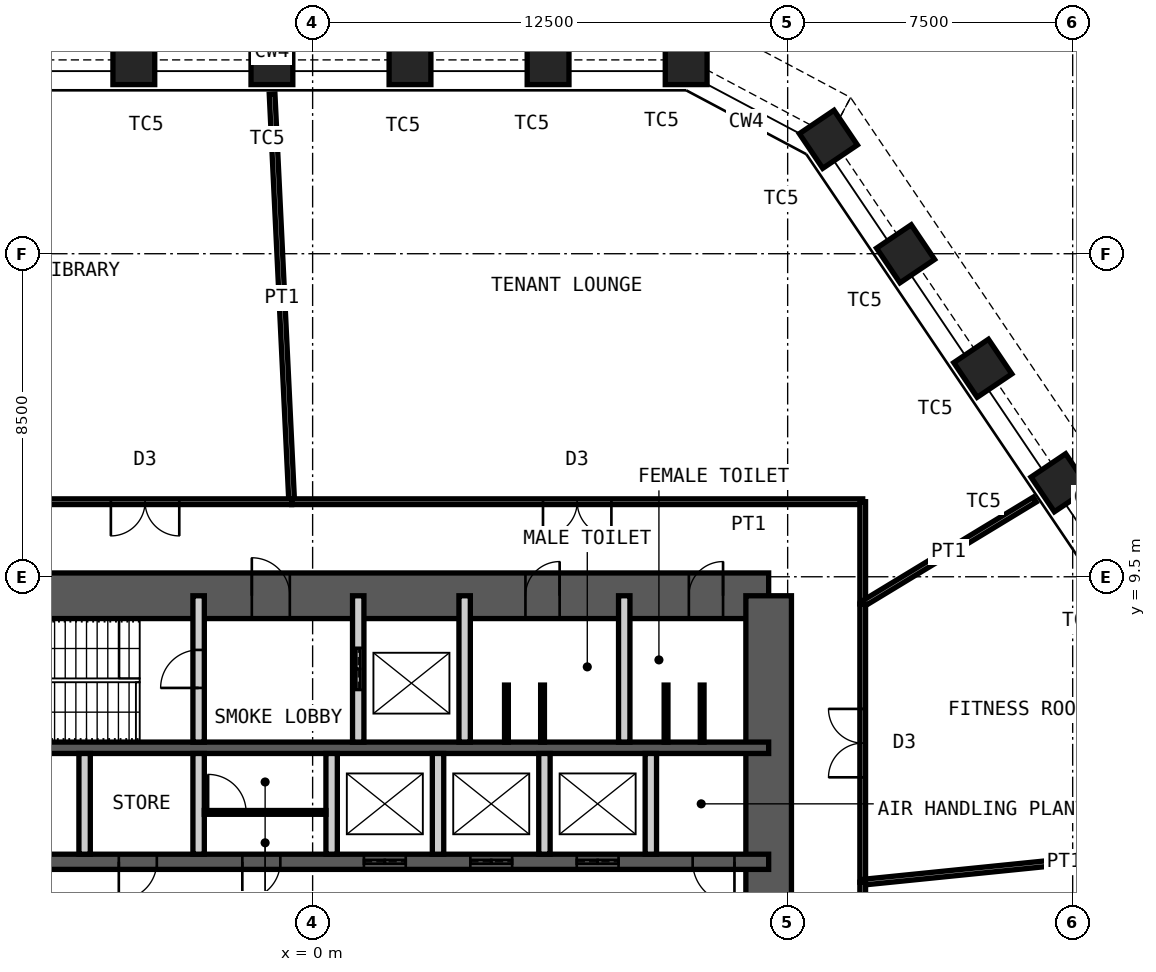
"""IFC4 building model, lengths in metres.
Left out: names, types, materials, properties, quantities, classifications, styles, units other than length and angle.
Written with IfcOpenShell. Run it as: python <this file> out.ifc"""

import sys

from ifc_helpers import new_model, si_unit, direction, frame, frame_2d, origin, origin_2d, place, context, subcontext, project, spatial, rectangle, hollow_rectangle, extrude, element, fill, save


model = new_model("IFC4")
c1 = context("Model", 3, precision=1e-05, world=origin(), true_north=direction((0.0, 1.0)))
c2 = subcontext(c1, "Body", "Model", "MODEL_VIEW")
j1 = project(units=[si_unit("LENGTHUNIT", "METRE"), si_unit("PLANEANGLEUNIT", "RADIAN")], contexts=[c1])
p1 = place(None, origin())
s1 = spatial("IfcSite", under=j1, at=p1, CompositionType="ELEMENT")
p2 = place(p1, origin())
s2 = spatial("IfcBuilding", under=s1, at=p2, CompositionType="ELEMENT")
p3 = place(p2, frame((0.0, 0.0, 218.2)))
s3 = spatial("IfcBuildingStorey", under=s2, at=p3, CompositionType="ELEMENT", Elevation=218.2)
for number, where, z_axis, x_axis in (
    (1, (-4.705, 23.0, 0.0), (0.0, 0.0, 1.0), (-1.0, 0.0, 0.0)),
    (2, (-1.071, 23.0, 0.0), (0.0, 0.0, 1.0), (-1.0, 0.0, 0.0)),
    (3, (2.562, 23.0, 0.0), (0.0, 0.0, 1.0), (-1.0, 0.0, 0.0)),
    (4, (6.196, 23.0, 0.0), (0.0, 0.0, 1.0), (-1.0, 0.0, 0.0)),
    (5, (9.829, 23.0, 0.0), (0.0, 0.0, 1.0), (-1.0, 0.0, 0.0)),
    (6, (13.571, 21.01, 0.0), (0.0, 0.0, 1.0), (-0.559, 0.829, 0.0)),
    (7, (15.603, 17.998, 0.0), (0.0, 0.0, 1.0), (-0.559, 0.829, 0.0)),
    (8, (17.635, 14.986, 0.0), (0.0, 0.0, 1.0), (-0.559, 0.829, 0.0)),
    (9, (19.667, 11.973, 0.0), (0.0, 0.0, 1.0), (-0.559, 0.829, 0.0)),
):
    element("IfcColumn", number, at=place(p3, frame(where, z_axis=z_axis, x_axis=x_axis)), inside=s3, PredefinedType="COLUMN", context=c2, shape_type="SweptSolid", body=[
        extrude(hollow_rectangle(XDim=1.1, YDim=1.1, WallThickness=0.07, at=origin_2d()), origin(), (0.0, 0.0, 1.0), 4.2),
    ])
p4 = place(p3, frame((-12.0, 9.0, 0.0), z_axis=(0.0, 0.0, 1.0), x_axis=(1.0, 0.0, 0.0)))
e10 = element("IfcWall", 10, at=p4, inside=s3, PredefinedType="SHEAR", context=c2, shape_type="SweptSolid", body=[
    extrude(rectangle(XDim=24.0, YDim=1.2, at=frame_2d((12.0, 0.0))), origin(), (0.0, 0.0, 1.0), 4.2),
])
p5 = place(p4, frame((10.4, 0.0, 0.0)))
e11 = element("IfcOpeningElement", 11, at=p5, cuts=e10, PredefinedType="OPENING", context=c2, shape_type="SweptSolid", body=[
    extrude(rectangle(XDim=1.0, YDim=2.1, at=frame_2d((0.5, 1.05))), frame((0.0, 0.61, 0.0), z_axis=(0.0, -1.0, 0.0), x_axis=(1.0, 0.0, 0.0)), (0.0, 0.0, 1.0), 1.22),
])
p6 = place(p4, frame((17.6, 0.0, 0.0)))
e12 = element("IfcOpeningElement", 12, at=p6, cuts=e10, PredefinedType="OPENING", context=c2, shape_type="SweptSolid", body=[
    extrude(rectangle(XDim=0.9, YDim=2.1, at=frame_2d((0.45, 1.05))), frame((0.0, 0.61, 0.0), z_axis=(0.0, -1.0, 0.0), x_axis=(1.0, 0.0, 0.0)), (0.0, 0.0, 1.0), 1.22),
])
p7 = place(p4, frame((21.9, 0.0, 0.0)))
e13 = element("IfcOpeningElement", 13, at=p7, cuts=e10, PredefinedType="OPENING", context=c2, shape_type="SweptSolid", body=[
    extrude(rectangle(XDim=0.9, YDim=2.1, at=frame_2d((0.45, 1.05))), frame((0.0, 0.61, 0.0), z_axis=(0.0, -1.0, 0.0), x_axis=(1.0, 0.0, 0.0)), (0.0, 0.0, 1.0), 1.22),
])
p8 = place(p3, frame((12.0, -9.0, 0.0), z_axis=(0.0, 0.0, 1.0), x_axis=(0.0, 1.0, 0.0)))
e14 = element("IfcWall", 14, at=p8, inside=s3, PredefinedType="SHEAR", context=c2, shape_type="SweptSolid", body=[
    extrude(rectangle(XDim=18.0, YDim=1.2, at=frame_2d((9.0, 0.0))), origin(), (0.0, 0.0, 1.0), 4.2),
])
p9 = place(p8, frame((8.1, 0.0, 0.0)))
e15 = element("IfcOpeningElement", 15, at=p9, cuts=e14, PredefinedType="OPENING", context=c2, shape_type="SweptSolid", body=[
    extrude(rectangle(XDim=1.8, YDim=2.1, at=frame_2d((0.9, 1.05))), frame((0.0, 0.61, 0.0), z_axis=(0.0, -1.0, 0.0), x_axis=(1.0, 0.0, 0.0)), (0.0, 0.0, 1.0), 1.22),
])
p10 = place(p3, frame((-12.0, 5.0, 0.0), z_axis=(0.0, 0.0, 1.0), x_axis=(1.0, 0.0, 0.0)))
e16 = element("IfcWall", 16, at=p10, inside=s3, PredefinedType="SHEAR", context=c2, shape_type="SweptSolid", body=[
    extrude(rectangle(XDim=24.0, YDim=0.3, at=frame_2d((12.0, 0.0))), origin(), (0.0, 0.0, 1.0), 4.2),
])
p11 = place(p3, frame((-12.0, 2.0, 0.0), z_axis=(0.0, 0.0, 1.0), x_axis=(1.0, 0.0, 0.0)))
e17 = element("IfcWall", 17, at=p11, inside=s3, PredefinedType="SHEAR", context=c2, shape_type="SweptSolid", body=[
    extrude(rectangle(XDim=24.0, YDim=0.4, at=frame_2d((12.0, 0.0))), origin(), (0.0, 0.0, 1.0), 4.2),
])
p12 = place(p11, frame((2.4, 0.0, 0.0)))
e18 = element("IfcOpeningElement", 18, at=p12, cuts=e17, PredefinedType="OPENING", context=c2, shape_type="SweptSolid", body=[
    extrude(rectangle(XDim=1.1, YDim=2.1, at=frame_2d((0.55, 1.05))), frame((0.0, 0.21, 0.0), z_axis=(0.0, -1.0, 0.0), x_axis=(1.0, 0.0, 0.0)), (0.0, 0.0, 1.0), 0.42),
])
p13 = place(p11, frame((22.0, 0.0, 0.0)))
e19 = element("IfcOpeningElement", 19, at=p13, cuts=e17, PredefinedType="OPENING", context=c2, shape_type="SweptSolid", body=[
    extrude(rectangle(XDim=1.1, YDim=2.1, at=frame_2d((0.55, 1.05))), frame((0.0, 0.21, 0.0), z_axis=(0.0, -1.0, 0.0), x_axis=(1.0, 0.0, 0.0)), (0.0, 0.0, 1.0), 0.42),
])
p14 = place(p11, frame((10.15, 0.0, 0.0)))
e20 = element("IfcOpeningElement", 20, at=p14, cuts=e17, PredefinedType="OPENING", context=c2, shape_type="SweptSolid", body=[
    extrude(rectangle(XDim=1.0, YDim=2.1, at=frame_2d((0.5, 1.05))), frame((0.0, 0.21, 0.0), z_axis=(0.0, -1.0, 0.0), x_axis=(1.0, 0.0, 0.0)), (0.0, 0.0, 1.0), 0.42),
])
p15 = place(p11, frame((6.9, 0.0, 0.0)))
e21 = element("IfcOpeningElement", 21, at=p15, cuts=e17, PredefinedType="OPENING", context=c2, shape_type="SweptSolid", body=[
    extrude(rectangle(XDim=1.0, YDim=2.1, at=frame_2d((0.5, 1.05))), frame((0.0, 0.21, 0.0), z_axis=(0.0, -1.0, 0.0), x_axis=(1.0, 0.0, 0.0)), (0.0, 0.0, 1.0), 0.42),
])
p16 = place(p11, frame((13.35, 0.0, 0.0)))
e22 = element("IfcOpeningElement", 22, at=p16, cuts=e17, PredefinedType="OPENING", context=c2, shape_type="SweptSolid", body=[
    extrude(rectangle(XDim=1.1, YDim=2.4, at=frame_2d((0.55, 1.2))), frame((0.0, 0.21, 0.0), z_axis=(0.0, -1.0, 0.0), x_axis=(1.0, 0.0, 0.0)), (0.0, 0.0, 1.0), 0.42),
])
p17 = place(p11, frame((16.15, 0.0, 0.0)))
e23 = element("IfcOpeningElement", 23, at=p17, cuts=e17, PredefinedType="OPENING", context=c2, shape_type="SweptSolid", body=[
    extrude(rectangle(XDim=1.1, YDim=2.4, at=frame_2d((0.55, 1.2))), frame((0.0, 0.21, 0.0), z_axis=(0.0, -1.0, 0.0), x_axis=(1.0, 0.0, 0.0)), (0.0, 0.0, 1.0), 0.42),
])
p18 = place(p11, frame((18.95, 0.0, 0.0)))
e24 = element("IfcOpeningElement", 24, at=p18, cuts=e17, PredefinedType="OPENING", context=c2, shape_type="SweptSolid", body=[
    extrude(rectangle(XDim=1.1, YDim=2.4, at=frame_2d((0.55, 1.2))), frame((0.0, 0.21, 0.0), z_axis=(0.0, -1.0, 0.0), x_axis=(1.0, 0.0, 0.0)), (0.0, 0.0, 1.0), 0.42),
])
p19 = place(p3, frame((-3.0, 5.15, 0.0), z_axis=(0.0, 0.0, 1.0), x_axis=(0.0, 1.0, 0.0)))
e25 = element("IfcWall", 25, at=p19, inside=s3, PredefinedType="PARTITIONING", context=c2, shape_type="SweptSolid", body=[
    extrude(rectangle(XDim=3.85, YDim=0.3, at=frame_2d((1.925, 0.0))), origin(), (0.0, 0.0, 1.0), 3.98),
])
p20 = place(p19, frame((1.425, 0.0, 0.0)))
e26 = element("IfcOpeningElement", 26, at=p20, cuts=e25, PredefinedType="OPENING", context=c2, shape_type="SweptSolid", body=[
    extrude(rectangle(XDim=1.0, YDim=2.1, at=frame_2d((0.5, 1.05))), frame((0.0, 0.16, 0.0), z_axis=(0.0, -1.0, 0.0), x_axis=(1.0, 0.0, 0.0)), (0.0, 0.0, 1.0), 0.32),
])
p21 = place(p3, frame((1.2, 5.15, 0.0), z_axis=(0.0, 0.0, 1.0), x_axis=(0.0, 1.0, 0.0)))
e27 = element("IfcWall", 27, at=p21, inside=s3, PredefinedType="PARTITIONING", context=c2, shape_type="SweptSolid", body=[
    extrude(rectangle(XDim=3.85, YDim=0.3, at=frame_2d((1.925, 0.0))), origin(), (0.0, 0.0, 1.0), 3.98),
])
p22 = place(p21, frame((1.375, 0.0, 0.0)))
e28 = element("IfcOpeningElement", 28, at=p22, cuts=e27, PredefinedType="OPENING", context=c2, shape_type="SweptSolid", body=[
    extrude(rectangle(XDim=1.1, YDim=2.4, at=frame_2d((0.55, 1.2))), frame((0.0, 0.16, 0.0), z_axis=(0.0, -1.0, 0.0), x_axis=(1.0, 0.0, 0.0)), (0.0, 0.0, 1.0), 0.32),
])
for number, where, z_axis, x_axis in (
    (29, (4.0, 5.15, 0.0), (0.0, 0.0, 1.0), (0.0, 1.0, 0.0)),
    (30, (8.2, 5.15, 0.0), (0.0, 0.0, 1.0), (0.0, 1.0, 0.0)),
):
    element("IfcWall", number, at=place(p3, frame(where, z_axis=z_axis, x_axis=x_axis)), inside=s3, PredefinedType="PARTITIONING", context=c2, shape_type="SweptSolid", body=[
        extrude(rectangle(XDim=3.85, YDim=0.3, at=frame_2d((1.925, 0.0))), origin(), (0.0, 0.0, 1.0), 3.98),
    ])
for number, where, z_axis, x_axis in (
    (31, (-6.0, 2.2, 0.0), (0.0, 0.0, 1.0), (0.0, 1.0, 0.0)),
    (32, (-3.0, 2.2, 0.0), (0.0, 0.0, 1.0), (0.0, 1.0, 0.0)),
    (33, (0.5, 2.2, 0.0), (0.0, 0.0, 1.0), (0.0, 1.0, 0.0)),
    (34, (3.3, 2.2, 0.0), (0.0, 0.0, 1.0), (0.0, 1.0, 0.0)),
    (35, (6.1, 2.2, 0.0), (0.0, 0.0, 1.0), (0.0, 1.0, 0.0)),
    (36, (8.9, 2.2, 0.0), (0.0, 0.0, 1.0), (0.0, 1.0, 0.0)),
):
    element("IfcWall", number, at=place(p3, frame(where, z_axis=z_axis, x_axis=x_axis)), inside=s3, PredefinedType="PARTITIONING", context=c2, shape_type="SweptSolid", body=[
        extrude(rectangle(XDim=2.65, YDim=0.3, at=frame_2d((1.325, 0.0))), origin(), (0.0, 0.0, 1.0), 3.98),
    ])
p23 = place(p3, frame((-2.85, 3.3, 0.0), z_axis=(0.0, 0.0, 1.0), x_axis=(1.0, 0.0, 0.0)))
e37 = element("IfcWall", 37, at=p23, inside=s3, PredefinedType="PARTITIONING", context=c2, shape_type="SweptSolid", body=[
    extrude(rectangle(XDim=3.2, YDim=0.1, at=frame_2d((1.6, 0.0))), origin(), (0.0, 0.0, 1.0), 3.98),
])
p24 = place(p23, frame((0.1, 0.0, 0.0)))
e38 = element("IfcOpeningElement", 38, at=p24, cuts=e37, PredefinedType="OPENING", context=c2, shape_type="SweptSolid", body=[
    extrude(rectangle(XDim=1.0, YDim=2.4, at=frame_2d((0.5, 1.2))), frame((0.0, 0.06, 0.0), z_axis=(0.0, -1.0, 0.0), x_axis=(1.0, 0.0, 0.0)), (0.0, 0.0, 1.0), 0.12),
])
for number, where, z_axis, x_axis in (
    (39, (5.1, 5.15, 0.0), (0.0, 0.0, 1.0), (0.0, 1.0, 0.0)),
    (40, (6.05, 5.15, 0.0), (0.0, 0.0, 1.0), (0.0, 1.0, 0.0)),
    (41, (9.3, 5.15, 0.0), (0.0, 0.0, 1.0), (0.0, 1.0, 0.0)),
    (42, (10.25, 5.15, 0.0), (0.0, 0.0, 1.0), (0.0, 1.0, 0.0)),
):
    element("IfcWall", number, at=place(p3, frame(where, z_axis=z_axis, x_axis=x_axis)), inside=s3, PredefinedType="PARTITIONING", context=c2, shape_type="SweptSolid", body=[
        extrude(rectangle(XDim=1.5, YDim=0.1, at=frame_2d((0.75, 0.0))), origin(), (0.0, 0.0, 1.0), 2.1),
    ])
p25 = place(p3, frame((-1.067, 22.2, 0.0), z_axis=(0.0, 0.0, 1.0), x_axis=(0.047998335863, -0.998847415652, 0.0)))
e43 = element("IfcWall", 43, at=p25, inside=s3, PredefinedType="PARTITIONING", context=c2, shape_type="SweptSolid", body=[
    extrude(rectangle(XDim=10.738, YDim=0.15, at=frame_2d((5.369, 0.0))), origin(), (0.0, 0.0, 1.0), 3.43),
])
p26 = place(p3, frame((-0.551, 11.475, 0.0), z_axis=(0.0, 0.0, 1.0), x_axis=(1.0, 0.0, 0.0)))
e44 = element("IfcWall", 44, at=p26, inside=s3, PredefinedType="PARTITIONING", context=c2, shape_type="SweptSolid", body=[
    extrude(rectangle(XDim=15.026, YDim=0.15, at=frame_2d((7.513, 0.0))), origin(), (0.0, 0.0, 1.0), 4.03),
])
p27 = place(p26, frame((6.613, 0.0, 0.0)))
e45 = element("IfcOpeningElement", 45, at=p27, cuts=e44, PredefinedType="OPENING", context=c2, shape_type="SweptSolid", body=[
    extrude(rectangle(XDim=1.8, YDim=2.4, at=frame_2d((0.9, 1.2))), frame((0.0, 0.085, 0.0), z_axis=(0.0, -1.0, 0.0), x_axis=(1.0, 0.0, 0.0)), (0.0, 0.0, 1.0), 0.17),
])
p28 = place(p3, frame((14.475, 11.475, 0.0), z_axis=(0.0, 0.0, 1.0), x_axis=(0.0, -1.0, 0.0)))
e46 = element("IfcWall", 46, at=p28, inside=s3, PredefinedType="PARTITIONING", context=c2, shape_type="SweptSolid", body=[
    extrude(rectangle(XDim=2.692, YDim=0.15, at=frame_2d((1.346, 0.0))), origin(), (0.0, 0.0, 1.0), 4.03),
])
p29 = place(p3, frame((19.001, 11.53, 0.0), z_axis=(0.0, 0.0, 1.0), x_axis=(-0.854906581035, -0.518781975114, 0.0)))
e47 = element("IfcWall", 47, at=p29, inside=s3, PredefinedType="PARTITIONING", context=c2, shape_type="SweptSolid", body=[
    extrude(rectangle(XDim=5.294, YDim=0.15, at=frame_2d((2.647, 0.0))), origin(), (0.0, 0.0, 1.0), 3.43),
])
p30 = place(p3, frame((14.475, 8.783, 0.0), z_axis=(0.0, 0.0, 1.0), x_axis=(0.0, -1.0, 0.0)))
e48 = element("IfcWall", 48, at=p30, inside=s3, PredefinedType="PARTITIONING", context=c2, shape_type="SweptSolid", body=[
    extrude(rectangle(XDim=7.321, YDim=0.15, at=frame_2d((3.66, 0.0))), origin(), (0.0, 0.0, 1.0), 4.03),
])
p31 = place(p30, frame((2.76, 0.0, 0.0)))
e49 = element("IfcOpeningElement", 49, at=p31, cuts=e48, PredefinedType="OPENING", context=c2, shape_type="SweptSolid", body=[
    extrude(rectangle(XDim=1.8, YDim=2.4, at=frame_2d((0.9, 1.2))), frame((0.0, 0.085, 0.0), z_axis=(0.0, -1.0, 0.0), x_axis=(1.0, 0.0, 0.0)), (0.0, 0.0, 1.0), 0.17),
])
p32 = place(p3, frame((25.083, 2.535, 0.0), z_axis=(0.0, 0.0, 1.0), x_axis=(-0.994932122767, -0.10054884925, 0.0)))
e50 = element("IfcWall", 50, at=p32, inside=s3, PredefinedType="PARTITIONING", context=c2, shape_type="SweptSolid", body=[
    extrude(rectangle(XDim=10.662, YDim=0.15, at=frame_2d((5.331, 0.0))), origin(), (0.0, 0.0, 1.0), 2.93),
])
p33 = place(p3, frame((14.475, 1.463, 0.0), z_axis=(0.0, 0.0, 1.0), x_axis=(0.0, -1.0, 0.0)))
e51 = element("IfcWall", 51, at=p33, inside=s3, PredefinedType="PARTITIONING", context=c2, shape_type="SweptSolid", body=[
    extrude(rectangle(XDim=8.918, YDim=0.15, at=frame_2d((4.459, 0.0))), origin(), (0.0, 0.0, 1.0), 4.03),
])
p34 = place(p33, frame((3.559, 0.0, 0.0)))
e52 = element("IfcOpeningElement", 52, at=p34, cuts=e51, PredefinedType="OPENING", context=c2, shape_type="SweptSolid", body=[
    extrude(rectangle(XDim=1.8, YDim=2.4, at=frame_2d((0.9, 1.2))), frame((0.0, 0.085, 0.0), z_axis=(0.0, -1.0, 0.0), x_axis=(1.0, 0.0, 0.0)), (0.0, 0.0, 1.0), 0.17),
])
p35 = place(p3, frame((-8.267, 11.475, 0.0), z_axis=(0.0, 0.0, 1.0), x_axis=(1.0, 0.0, 0.0)))
e53 = element("IfcWall", 53, at=p35, inside=s3, PredefinedType="PARTITIONING", context=c2, shape_type="SweptSolid", body=[
    extrude(rectangle(XDim=7.716, YDim=0.15, at=frame_2d((3.858, 0.0))), origin(), (0.0, 0.0, 1.0), 4.03),
])
p36 = place(p35, frame((2.958, 0.0, 0.0)))
e54 = element("IfcOpeningElement", 54, at=p36, cuts=e53, PredefinedType="OPENING", context=c2, shape_type="SweptSolid", body=[
    extrude(rectangle(XDim=1.8, YDim=2.4, at=frame_2d((0.9, 1.2))), frame((0.0, 0.085, 0.0), z_axis=(0.0, -1.0, 0.0), x_axis=(1.0, 0.0, 0.0)), (0.0, 0.0, 1.0), 0.17),
])
p37 = place(p5, origin())
e55 = element("IfcDoor", 55, at=p37, inside=s3, OperationType="SINGLE_SWING_RIGHT", PredefinedType="DOOR", context=c2, shape_type="SweptSolid", body=[
    extrude(rectangle(XDim=1.0, YDim=2.1, at=frame_2d((0.5, 1.05))), frame((0.0, 0.025, 0.0), z_axis=(0.0, -1.0, 0.0), x_axis=(1.0, 0.0, 0.0)), (0.0, 0.0, 1.0), 0.05),
])
fill(e11, e55)
p38 = place(p6, origin())
e56 = element("IfcDoor", 56, at=p38, inside=s3, OperationType="SINGLE_SWING_LEFT", PredefinedType="DOOR", context=c2, shape_type="SweptSolid", body=[
    extrude(rectangle(XDim=0.9, YDim=2.1, at=frame_2d((0.45, 1.05))), frame((0.0, 0.025, 0.0), z_axis=(0.0, -1.0, 0.0), x_axis=(1.0, 0.0, 0.0)), (0.0, 0.0, 1.0), 0.05),
])
fill(e12, e56)
p39 = place(p7, origin())
e57 = element("IfcDoor", 57, at=p39, inside=s3, OperationType="SINGLE_SWING_LEFT", PredefinedType="DOOR", context=c2, shape_type="SweptSolid", body=[
    extrude(rectangle(XDim=0.9, YDim=2.1, at=frame_2d((0.45, 1.05))), frame((0.0, 0.025, 0.0), z_axis=(0.0, -1.0, 0.0), x_axis=(1.0, 0.0, 0.0)), (0.0, 0.0, 1.0), 0.05),
])
fill(e13, e57)
p40 = place(p20, origin())
e58 = element("IfcDoor", 58, at=p40, inside=s3, OperationType="SINGLE_SWING_RIGHT", PredefinedType="DOOR", context=c2, shape_type="SweptSolid", body=[
    extrude(rectangle(XDim=1.0, YDim=2.1, at=frame_2d((0.5, 1.05))), frame((0.0, 0.025, 0.0), z_axis=(0.0, -1.0, 0.0), x_axis=(1.0, 0.0, 0.0)), (0.0, 0.0, 1.0), 0.05),
])
fill(e26, e58)
p41 = place(p13, origin())
e59 = element("IfcDoor", 59, at=p41, inside=s3, OperationType="SINGLE_SWING_RIGHT", PredefinedType="DOOR", context=c2, shape_type="SweptSolid", body=[
    extrude(rectangle(XDim=1.1, YDim=2.1, at=frame_2d((0.55, 1.05))), frame((0.0, 0.025, 0.0), z_axis=(0.0, -1.0, 0.0), x_axis=(1.0, 0.0, 0.0)), (0.0, 0.0, 1.0), 0.05),
])
fill(e19, e59)
p42 = place(p14, origin())
e60 = element("IfcDoor", 60, at=p42, inside=s3, OperationType="SINGLE_SWING_LEFT", PredefinedType="DOOR", context=c2, shape_type="SweptSolid", body=[
    extrude(rectangle(XDim=1.0, YDim=2.1, at=frame_2d((0.5, 1.05))), frame((0.0, 0.025, 0.0), z_axis=(0.0, -1.0, 0.0), x_axis=(1.0, 0.0, 0.0)), (0.0, 0.0, 1.0), 0.05),
])
fill(e20, e60)
p43 = place(p22, origin())
e61 = element("IfcDoor", 61, at=p43, inside=s3, OperationType="DOUBLE_DOOR_SLIDING", PredefinedType="DOOR", context=c2, shape_type="SweptSolid", body=[
    extrude(rectangle(XDim=1.1, YDim=2.4, at=frame_2d((0.55, 1.2))), frame((0.0, 0.025, 0.0), z_axis=(0.0, -1.0, 0.0), x_axis=(1.0, 0.0, 0.0)), (0.0, 0.0, 1.0), 0.05),
])
fill(e28, e61)
p44 = place(p15, origin())
e62 = element("IfcDoor", 62, at=p44, inside=s3, OperationType="SINGLE_SWING_LEFT", PredefinedType="DOOR", context=c2, shape_type="SweptSolid", body=[
    extrude(rectangle(XDim=1.0, YDim=2.1, at=frame_2d((0.5, 1.05))), frame((0.0, 0.025, 0.0), z_axis=(0.0, -1.0, 0.0), x_axis=(1.0, 0.0, 0.0)), (0.0, 0.0, 1.0), 0.05),
])
fill(e21, e62)
p45 = place(p16, origin())
e63 = element("IfcDoor", 63, at=p45, inside=s3, OperationType="DOUBLE_DOOR_SLIDING", PredefinedType="DOOR", context=c2, shape_type="SweptSolid", body=[
    extrude(rectangle(XDim=1.1, YDim=2.4, at=frame_2d((0.55, 1.2))), frame((0.0, 0.025, 0.0), z_axis=(0.0, -1.0, 0.0), x_axis=(1.0, 0.0, 0.0)), (0.0, 0.0, 1.0), 0.05),
])
fill(e22, e63)
p46 = place(p17, origin())
e64 = element("IfcDoor", 64, at=p46, inside=s3, OperationType="DOUBLE_DOOR_SLIDING", PredefinedType="DOOR", context=c2, shape_type="SweptSolid", body=[
    extrude(rectangle(XDim=1.1, YDim=2.4, at=frame_2d((0.55, 1.2))), frame((0.0, 0.025, 0.0), z_axis=(0.0, -1.0, 0.0), x_axis=(1.0, 0.0, 0.0)), (0.0, 0.0, 1.0), 0.05),
])
fill(e23, e64)
p47 = place(p18, origin())
e65 = element("IfcDoor", 65, at=p47, inside=s3, OperationType="DOUBLE_DOOR_SLIDING", PredefinedType="DOOR", context=c2, shape_type="SweptSolid", body=[
    extrude(rectangle(XDim=1.1, YDim=2.4, at=frame_2d((0.55, 1.2))), frame((0.0, 0.025, 0.0), z_axis=(0.0, -1.0, 0.0), x_axis=(1.0, 0.0, 0.0)), (0.0, 0.0, 1.0), 0.05),
])
fill(e24, e65)
p48 = place(p24, origin())
e66 = element("IfcDoor", 66, at=p48, inside=s3, OperationType="SINGLE_SWING_RIGHT", PredefinedType="DOOR", context=c2, shape_type="SweptSolid", body=[
    extrude(rectangle(XDim=1.0, YDim=2.4, at=frame_2d((0.5, 1.2))), frame((0.0, 0.025, 0.0), z_axis=(0.0, -1.0, 0.0), x_axis=(1.0, 0.0, 0.0)), (0.0, 0.0, 1.0), 0.05),
])
fill(e38, e66)
p49 = place(p27, origin())
e67 = element("IfcDoor", 67, at=p49, inside=s3, OperationType="DOUBLE_DOOR_DOUBLE_SWING", PredefinedType="DOOR", context=c2, shape_type="SweptSolid", body=[
    extrude(rectangle(XDim=1.8, YDim=2.4, at=frame_2d((0.9, 1.2))), frame((0.0, 0.025, 0.0), z_axis=(0.0, -1.0, 0.0), x_axis=(1.0, 0.0, 0.0)), (0.0, 0.0, 1.0), 0.05),
])
fill(e45, e67)
p50 = place(p31, origin())
e68 = element("IfcDoor", 68, at=p50, inside=s3, OperationType="DOUBLE_DOOR_DOUBLE_SWING", PredefinedType="DOOR", context=c2, shape_type="SweptSolid", body=[
    extrude(rectangle(XDim=1.8, YDim=2.4, at=frame_2d((0.9, 1.2))), frame((0.0, 0.025, 0.0), z_axis=(0.0, -1.0, 0.0), x_axis=(1.0, 0.0, 0.0)), (0.0, 0.0, 1.0), 0.05),
])
fill(e49, e68)
p51 = place(p36, origin())
e69 = element("IfcDoor", 69, at=p51, inside=s3, OperationType="DOUBLE_DOOR_DOUBLE_SWING", PredefinedType="DOOR", context=c2, shape_type="SweptSolid", body=[
    extrude(rectangle(XDim=1.8, YDim=2.4, at=frame_2d((0.9, 1.2))), frame((0.0, 0.025, 0.0), z_axis=(0.0, -1.0, 0.0), x_axis=(1.0, 0.0, 0.0)), (0.0, 0.0, 1.0), 0.05),
])
fill(e54, e69)
save(model, sys.argv[1])
